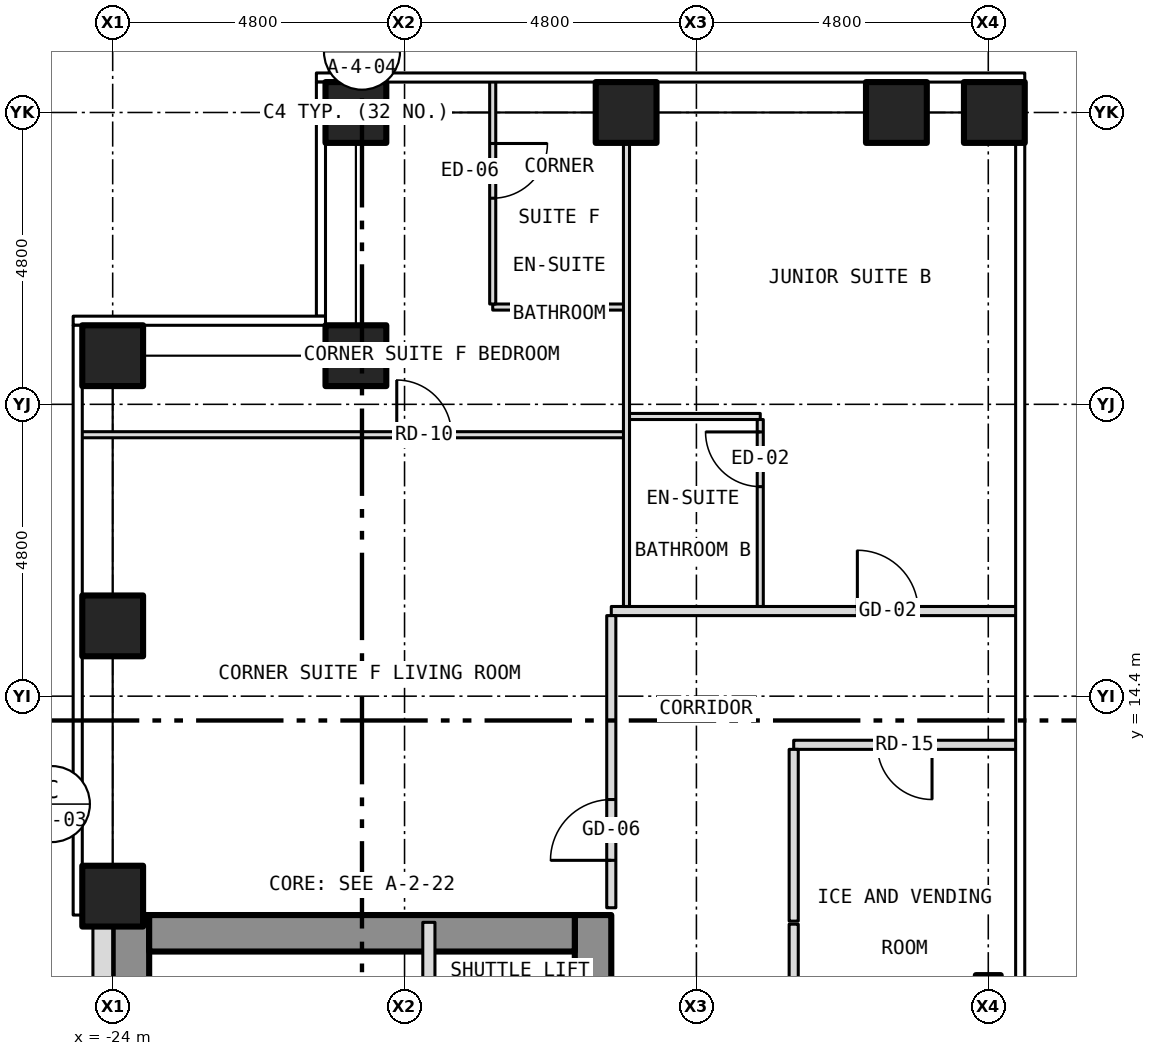
"""IFC4 building model, lengths in metres.
Left out: names, types, materials, properties, quantities, classifications, styles, units other than length and angle.
Written with IfcOpenShell. Run it as: python <this file> out.ifc"""

import sys

from ifc_helpers import new_model, si_unit, direction, frame, frame_2d, origin, origin_2d, place, context, subcontext, project, spatial, rectangle, hollow_rectangle, i_section, extrude, element, fill, save


model = new_model("IFC4")
c1 = context("Model", 3, precision=1e-05, world=origin(), true_north=direction((0.0, 1.0)))
c2 = subcontext(c1, "Body", "Model", "MODEL_VIEW")
j1 = project(units=[si_unit("LENGTHUNIT", "METRE"), si_unit("PLANEANGLEUNIT", "RADIAN")], contexts=[c1])
p1 = place(None, origin())
s1 = spatial("IfcSite", under=j1, at=p1, CompositionType="ELEMENT")
p2 = place(p1, origin())
s2 = spatial("IfcBuilding", under=s1, at=p2, CompositionType="ELEMENT")
p3 = place(p2, frame((0.0, 0.0, 81.0)))
s3 = spatial("IfcBuildingStorey", under=s2, at=p3, CompositionType="ELEMENT", Elevation=81.0)
for number, where, z_axis, x_axis in (
    (1, (-20.0, 24.0, -0.15), (0.0, 0.0, 1.0), (1.0, 0.0, 0.0)),
    (2, (-15.556, 24.0, -0.15), (0.0, 0.0, 1.0), (1.0, 0.0, 0.0)),
    (3, (-11.111, 24.0, -0.15), (0.0, 0.0, 1.0), (1.0, 0.0, 0.0)),
    (4, (-24.0, 11.111, -0.15), (0.0, 0.0, 1.0), (1.0, 0.0, 0.0)),
    (5, (-24.0, 15.556, -0.15), (0.0, 0.0, 1.0), (1.0, 0.0, 0.0)),
    (6, (-24.0, 20.0, -0.15), (0.0, 0.0, 1.0), (1.0, 0.0, 0.0)),
    (7, (-20.0, 20.0, -0.15), (0.0, 0.0, 1.0), (1.0, 0.0, 0.0)),
    (8, (-9.5, 24.0, -0.15), (0.0, 0.0, 1.0), (1.0, 0.0, 0.0)),
):
    element("IfcColumn", number, at=place(p3, frame(where, z_axis=z_axis, x_axis=x_axis)), inside=s3, PredefinedType="COLUMN", context=c2, shape_type="SweptSolid", body=[
        extrude(hollow_rectangle(XDim=1.0, YDim=1.0, WallThickness=0.06, at=origin_2d()), origin(), (0.0, 0.0, 1.0), 3.35),
    ])
p4 = place(p3, frame((-9.6, 9.6, -0.15), z_axis=(0.0, 0.0, 1.0), x_axis=(1.0, 0.0, 0.0)))
e9 = element("IfcColumn", 9, at=p4, inside=s3, PredefinedType="COLUMN", context=c2, shape_type="SweptSolid", body=[
    extrude(i_section(OverallWidth=0.409, OverallDepth=0.424, WebThickness=0.033, FlangeThickness=0.052, at=origin_2d()), origin(), (0.0, 0.0, 1.0), 3.35),
])
p5 = place(p3, frame((-16.1, -10.8, 0.0), z_axis=(0.0, 0.0, 1.0), x_axis=(0.0, 1.0, 0.0)))
e10 = element("IfcWall", 10, at=p5, inside=s3, PredefinedType="SHEAR", context=c2, shape_type="SweptSolid", body=[
    extrude(rectangle(XDim=21.6, YDim=0.6, at=frame_2d((10.8, 0.0))), origin(), (0.0, 0.0, 1.0), 2.9),
])
p6 = place(p5, frame((9.4, 0.0, 0.0)))
e11 = element("IfcOpeningElement", 11, at=p6, cuts=e10, PredefinedType="OPENING", context=c2, shape_type="SweptSolid", body=[
    extrude(rectangle(XDim=1.1, YDim=2.1, at=frame_2d((0.55, 1.05))), frame((0.0, 0.312, 0.0), z_axis=(0.0, -1.0, 0.0), x_axis=(1.0, 0.0, 0.0)), (0.0, 0.0, 1.0), 0.624),
])
p7 = place(p5, frame((11.5, 0.0, 0.0)))
e12 = element("IfcOpeningElement", 12, at=p7, cuts=e10, PredefinedType="OPENING", context=c2, shape_type="SweptSolid", body=[
    extrude(rectangle(XDim=1.1, YDim=2.1, at=frame_2d((0.55, 1.05))), frame((0.0, 0.312, 0.0), z_axis=(0.0, -1.0, 0.0), x_axis=(1.0, 0.0, 0.0)), (0.0, 0.0, 1.0), 0.624),
])
p8 = place(p5, frame((13.6, 0.0, 0.0)))
e13 = element("IfcOpeningElement", 13, at=p8, cuts=e10, PredefinedType="OPENING", context=c2, shape_type="SweptSolid", body=[
    extrude(rectangle(XDim=1.1, YDim=2.1, at=frame_2d((0.55, 1.05))), frame((0.0, 0.312, 0.0), z_axis=(0.0, -1.0, 0.0), x_axis=(1.0, 0.0, 0.0)), (0.0, 0.0, 1.0), 0.624),
])
p9 = place(p5, frame((15.7, 0.0, 0.0)))
e14 = element("IfcOpeningElement", 14, at=p9, cuts=e10, PredefinedType="OPENING", context=c2, shape_type="SweptSolid", body=[
    extrude(rectangle(XDim=1.1, YDim=2.1, at=frame_2d((0.55, 1.05))), frame((0.0, 0.312, 0.0), z_axis=(0.0, -1.0, 0.0), x_axis=(1.0, 0.0, 0.0)), (0.0, 0.0, 1.0), 0.624),
])
p10 = place(p5, frame((17.8, 0.0, 0.0)))
e15 = element("IfcOpeningElement", 15, at=p10, cuts=e10, PredefinedType="OPENING", context=c2, shape_type="SweptSolid", body=[
    extrude(rectangle(XDim=1.1, YDim=2.1, at=frame_2d((0.55, 1.05))), frame((0.0, 0.312, 0.0), z_axis=(0.0, -1.0, 0.0), x_axis=(1.0, 0.0, 0.0)), (0.0, 0.0, 1.0), 0.624),
])
p11 = place(p5, frame((0.758, 0.0, 0.0)))
e16 = element("IfcOpeningElement", 16, at=p11, cuts=e10, PredefinedType="OPENING", context=c2, shape_type="SweptSolid", body=[
    extrude(rectangle(XDim=1.1, YDim=2.1, at=frame_2d((0.55, 1.05))), frame((0.0, 0.312, 0.0), z_axis=(0.0, -1.0, 0.0), x_axis=(1.0, 0.0, 0.0)), (0.0, 0.0, 1.0), 0.624),
])
p12 = place(p5, frame((7.5, 0.0, 0.0)))
e17 = element("IfcOpeningElement", 17, at=p12, cuts=e10, PredefinedType="OPENING", context=c2, shape_type="SweptSolid", body=[
    extrude(rectangle(XDim=1.1, YDim=2.1, at=frame_2d((0.55, 1.05))), frame((0.0, 0.312, 0.0), z_axis=(0.0, -1.0, 0.0), x_axis=(1.0, 0.0, 0.0)), (0.0, 0.0, 1.0), 0.624),
])
p13 = place(p3, frame((-23.7, -10.8, 0.0), z_axis=(0.0, 0.0, 1.0), x_axis=(0.0, 1.0, 0.0)))
e18 = element("IfcWall", 18, at=p13, inside=s3, PredefinedType="SHEAR", context=c2, shape_type="SweptSolid", body=[
    extrude(rectangle(XDim=21.6, YDim=0.6, at=frame_2d((10.8, 0.0))), origin(), (0.0, 0.0, 1.0), 2.9),
])
p14 = place(p3, frame((-23.4, 10.5, 0.0), z_axis=(0.0, 0.0, 1.0), x_axis=(1.0, 0.0, 0.0)))
e19 = element("IfcWall", 19, at=p14, inside=s3, PredefinedType="SHEAR", context=c2, shape_type="SweptSolid", body=[
    extrude(rectangle(XDim=7.0, YDim=0.6, at=frame_2d((3.5, 0.0))), origin(), (0.0, 0.0, 1.0), 2.9),
])
p15 = place(p3, frame((-24.163, 10.8, 0.0), z_axis=(0.0, 0.0, 1.0), x_axis=(0.0, -1.0, 0.0)))
e20 = element("IfcWall", 20, at=p15, inside=s3, PredefinedType="SOLIDWALL", context=c2, shape_type="SweptSolid", body=[
    extrude(rectangle(XDim=21.6, YDim=0.325, at=frame_2d((10.8, 0.0))), origin(), (0.0, 0.0, 1.0), 3.5),
])
p16 = place(p15, frame((18.05, 0.0, 1.0)))
e21 = element("IfcOpeningElement", 21, at=p16, cuts=e20, PredefinedType="OPENING", context=c2, shape_type="SweptSolid", body=[
    extrude(rectangle(XDim=0.6, YDim=1.5, at=frame_2d((0.3, 0.75))), frame((0.0, 0.175, 0.0), z_axis=(0.0, -1.0, 0.0), x_axis=(1.0, 0.0, 0.0)), (0.0, 0.0, 1.0), 0.349),
])
p17 = place(p3, frame((-12.8, 13.6, 0.0), z_axis=(0.0, 0.0, 1.0), x_axis=(1.0, 0.0, 0.0)))
e22 = element("IfcWall", 22, at=p17, inside=s3, PredefinedType="PARTITIONING", context=c2, shape_type="SweptSolid", body=[
    extrude(rectangle(XDim=3.68, YDim=0.15, at=frame_2d((1.84, 0.0))), origin(), (0.0, 0.0, 1.0), 3.2),
])
p18 = place(p17, frame((1.375, 0.0, 0.0)))
e23 = element("IfcOpeningElement", 23, at=p18, cuts=e22, PredefinedType="OPENING", context=c2, shape_type="SweptSolid", body=[
    extrude(rectangle(XDim=0.9, YDim=2.1, at=frame_2d((0.45, 1.05))), frame((0.0, 0.087, 0.0), z_axis=(0.0, -1.0, 0.0), x_axis=(1.0, 0.0, 0.0)), (0.0, 0.0, 1.0), 0.174),
])
p19 = place(p3, frame((-15.8, 15.8, 0.0), z_axis=(0.0, 0.0, 1.0), x_axis=(1.0, 0.0, 0.0)))
e24 = element("IfcWall", 24, at=p19, inside=s3, PredefinedType="PARTITIONING", context=c2, shape_type="SweptSolid", body=[
    extrude(rectangle(XDim=6.68, YDim=0.15, at=frame_2d((3.34, 0.0))), origin(), (0.0, 0.0, 1.0), 3.2),
])
p20 = place(p19, frame((4.047, 0.0, 0.0)))
e25 = element("IfcOpeningElement", 25, at=p20, cuts=e24, PredefinedType="OPENING", context=c2, shape_type="SweptSolid", body=[
    extrude(rectangle(XDim=1.0, YDim=2.1, at=frame_2d((0.5, 1.05))), frame((0.0, 0.087, 0.0), z_axis=(0.0, -1.0, 0.0), x_axis=(1.0, 0.0, 0.0)), (0.0, 0.0, 1.0), 0.174),
])
p21 = place(p3, frame((-24.53, 18.7, 0.0), z_axis=(0.0, 0.0, 1.0), x_axis=(1.0, 0.0, 0.0)))
e26 = element("IfcWall", 26, at=p21, inside=s3, PredefinedType="PARTITIONING", context=c2, shape_type="SweptSolid", body=[
    extrude(rectangle(XDim=8.98, YDim=0.1, at=frame_2d((4.49, 0.0))), origin(), (0.0, 0.0, 1.0), 3.2),
])
p22 = place(p21, frame((5.202, 0.0, 0.0)))
e27 = element("IfcOpeningElement", 27, at=p22, cuts=e26, PredefinedType="OPENING", context=c2, shape_type="SweptSolid", body=[
    extrude(rectangle(XDim=0.9, YDim=2.1, at=frame_2d((0.45, 1.05))), frame((0.0, 0.062, 0.0), z_axis=(0.0, -1.0, 0.0), x_axis=(1.0, 0.0, 0.0)), (0.0, 0.0, 1.0), 0.124),
])
for number, where, z_axis, x_axis in (
    (28, (-15.55, 19.0, 0.0), (0.0, 0.0, 1.0), (1.0, 0.0, 0.0)),
    (29, (-17.75, 20.8, 0.0), (0.0, 0.0, 1.0), (1.0, 0.0, 0.0)),
):
    element("IfcWall", number, at=place(p3, frame(where, z_axis=z_axis, x_axis=x_axis)), inside=s3, PredefinedType="PARTITIONING", context=c2, shape_type="SweptSolid", body=[
        extrude(rectangle(XDim=2.2, YDim=0.1, at=frame_2d((1.1, 0.0))), origin(), (0.0, 0.0, 1.0), 3.2),
    ])
p23 = place(p3, frame((-18.8, -1.8, 0.0), z_axis=(0.0, 0.0, 1.0), x_axis=(0.0, 1.0, 0.0)))
e30 = element("IfcWall", 30, at=p23, inside=s3, PredefinedType="PARTITIONING", context=c2, shape_type="SweptSolid", body=[
    extrude(rectangle(XDim=12.48, YDim=0.2, at=frame_2d((6.24, 0.0))), origin(), (0.0, 0.0, 1.0), 2.9),
])
p24 = place(p3, frame((-17.75, 20.85, 0.0), z_axis=(0.0, 0.0, 1.0), x_axis=(0.0, 1.0, 0.0)))
e31 = element("IfcWall", 31, at=p24, inside=s3, PredefinedType="PARTITIONING", context=c2, shape_type="SweptSolid", body=[
    extrude(rectangle(XDim=3.68, YDim=0.1, at=frame_2d((1.84, 0.0))), origin(), (0.0, 0.0, 1.0), 3.2),
])
p25 = place(p24, frame((1.74, 0.0, 0.0)))
e32 = element("IfcOpeningElement", 32, at=p25, cuts=e31, PredefinedType="OPENING", context=c2, shape_type="SweptSolid", body=[
    extrude(rectangle(XDim=0.9, YDim=2.1, at=frame_2d((0.45, 1.05))), frame((0.0, 0.062, 0.0), z_axis=(0.0, -1.0, 0.0), x_axis=(1.0, 0.0, 0.0)), (0.0, 0.0, 1.0), 0.124),
])
p26 = place(p3, frame((-15.8, 10.92, 0.0), z_axis=(0.0, 0.0, 1.0), x_axis=(0.0, 1.0, 0.0)))
e33 = element("IfcWall", 33, at=p26, inside=s3, PredefinedType="PARTITIONING", context=c2, shape_type="SweptSolid", body=[
    extrude(rectangle(XDim=4.805, YDim=0.15, at=frame_2d((2.403, 0.0))), origin(), (0.0, 0.0, 1.0), 3.2),
])
p27 = place(p26, frame((0.78, 0.0, 0.0)))
e34 = element("IfcOpeningElement", 34, at=p27, cuts=e33, PredefinedType="OPENING", context=c2, shape_type="SweptSolid", body=[
    extrude(rectangle(XDim=1.0, YDim=2.1, at=frame_2d((0.5, 1.05))), frame((0.0, 0.087, 0.0), z_axis=(0.0, -1.0, 0.0), x_axis=(1.0, 0.0, 0.0)), (0.0, 0.0, 1.0), 0.174),
])
p28 = place(p3, frame((-15.55, 15.875, 0.0), z_axis=(0.0, 0.0, 1.0), x_axis=(0.0, 1.0, 0.0)))
e35 = element("IfcWall", 35, at=p28, inside=s3, PredefinedType="PARTITIONING", context=c2, shape_type="SweptSolid", body=[
    extrude(rectangle(XDim=8.005, YDim=0.1, at=frame_2d((4.002, 0.0))), origin(), (0.0, 0.0, 1.0), 3.2),
])
p29 = place(p3, frame((-13.35, 15.875, 0.0), z_axis=(0.0, 0.0, 1.0), x_axis=(0.0, 1.0, 0.0)))
e36 = element("IfcWall", 36, at=p29, inside=s3, PredefinedType="PARTITIONING", context=c2, shape_type="SweptSolid", body=[
    extrude(rectangle(XDim=3.075, YDim=0.1, at=frame_2d((1.538, 0.0))), origin(), (0.0, 0.0, 1.0), 3.2),
])
p30 = place(p29, frame((1.971, 0.0, 0.0)))
e37 = element("IfcOpeningElement", 37, at=p30, cuts=e36, PredefinedType="OPENING", context=c2, shape_type="SweptSolid", body=[
    extrude(rectangle(XDim=0.9, YDim=2.1, at=frame_2d((0.45, 1.05))), frame((0.0, 0.062, 0.0), z_axis=(0.0, -1.0, 0.0), x_axis=(1.0, 0.0, 0.0)), (0.0, 0.0, 1.0), 0.124),
])
p31 = place(p3, frame((-12.8, 8.175, 0.0), z_axis=(0.0, 0.0, 1.0), x_axis=(0.0, 1.0, 0.0)))
e38 = element("IfcWall", 38, at=p31, inside=s3, PredefinedType="PARTITIONING", context=c2, shape_type="SweptSolid", body=[
    extrude(rectangle(XDim=2.475, YDim=0.15, at=frame_2d((1.237, 0.0))), origin(), (0.0, 0.0, 1.0), 3.2),
])
p32 = place(p3, frame((-12.8, 10.7, 0.0), z_axis=(0.0, 0.0, 1.0), x_axis=(0.0, 1.0, 0.0)))
e39 = element("IfcWall", 39, at=p32, inside=s3, PredefinedType="PARTITIONING", context=c2, shape_type="SweptSolid", body=[
    extrude(rectangle(XDim=2.825, YDim=0.15, at=frame_2d((1.413, 0.0))), origin(), (0.0, 0.0, 1.0), 3.2),
])
p33 = place(p20, origin())
e40 = element("IfcDoor", 40, at=p33, inside=s3, OperationType="SINGLE_SWING_LEFT", PredefinedType="DOOR", context=c2, shape_type="SweptSolid", body=[
    extrude(rectangle(XDim=1.0, YDim=2.1, at=frame_2d((0.5, 1.05))), frame((0.0, 0.025, 0.0), z_axis=(0.0, -1.0, 0.0), x_axis=(1.0, 0.0, 0.0)), (0.0, 0.0, 1.0), 0.05),
])
fill(e25, e40)
p34 = place(p30, origin())
e41 = element("IfcDoor", 41, at=p34, inside=s3, OperationType="SINGLE_SWING_RIGHT", PredefinedType="DOOR", context=c2, shape_type="SweptSolid", body=[
    extrude(rectangle(XDim=0.9, YDim=2.1, at=frame_2d((0.45, 1.05))), frame((0.0, 0.025, 0.0), z_axis=(0.0, -1.0, 0.0), x_axis=(1.0, 0.0, 0.0)), (0.0, 0.0, 1.0), 0.05),
])
fill(e37, e41)
p35 = place(p27, origin())
e42 = element("IfcDoor", 42, at=p35, inside=s3, OperationType="SINGLE_SWING_LEFT", PredefinedType="DOOR", context=c2, shape_type="SweptSolid", body=[
    extrude(rectangle(XDim=1.0, YDim=2.1, at=frame_2d((0.5, 1.05))), frame((0.0, 0.025, 0.0), z_axis=(0.0, -1.0, 0.0), x_axis=(1.0, 0.0, 0.0)), (0.0, 0.0, 1.0), 0.05),
])
fill(e34, e42)
p36 = place(p22, origin())
e43 = element("IfcDoor", 43, at=p36, inside=s3, OperationType="SINGLE_SWING_LEFT", PredefinedType="DOOR", context=c2, shape_type="SweptSolid", body=[
    extrude(rectangle(XDim=0.9, YDim=2.1, at=frame_2d((0.45, 1.05))), frame((0.0, 0.025, 0.0), z_axis=(0.0, -1.0, 0.0), x_axis=(1.0, 0.0, 0.0)), (0.0, 0.0, 1.0), 0.05),
])
fill(e27, e43)
p37 = place(p25, origin())
e44 = element("IfcDoor", 44, at=p37, inside=s3, OperationType="SINGLE_SWING_RIGHT", PredefinedType="DOOR", context=c2, shape_type="SweptSolid", body=[
    extrude(rectangle(XDim=0.9, YDim=2.1, at=frame_2d((0.45, 1.05))), frame((0.0, 0.025, 0.0), z_axis=(0.0, -1.0, 0.0), x_axis=(1.0, 0.0, 0.0)), (0.0, 0.0, 1.0), 0.05),
])
fill(e32, e44)
p38 = place(p18, origin())
e45 = element("IfcDoor", 45, at=p38, inside=s3, OperationType="SINGLE_SWING_RIGHT", PredefinedType="DOOR", context=c2, shape_type="SweptSolid", body=[
    extrude(rectangle(XDim=0.9, YDim=2.1, at=frame_2d((0.45, 1.05))), frame((0.0, 0.025, 0.0), z_axis=(0.0, -1.0, 0.0), x_axis=(1.0, 0.0, 0.0)), (0.0, 0.0, 1.0), 0.05),
])
fill(e23, e45)
save(model, sys.argv[1])
